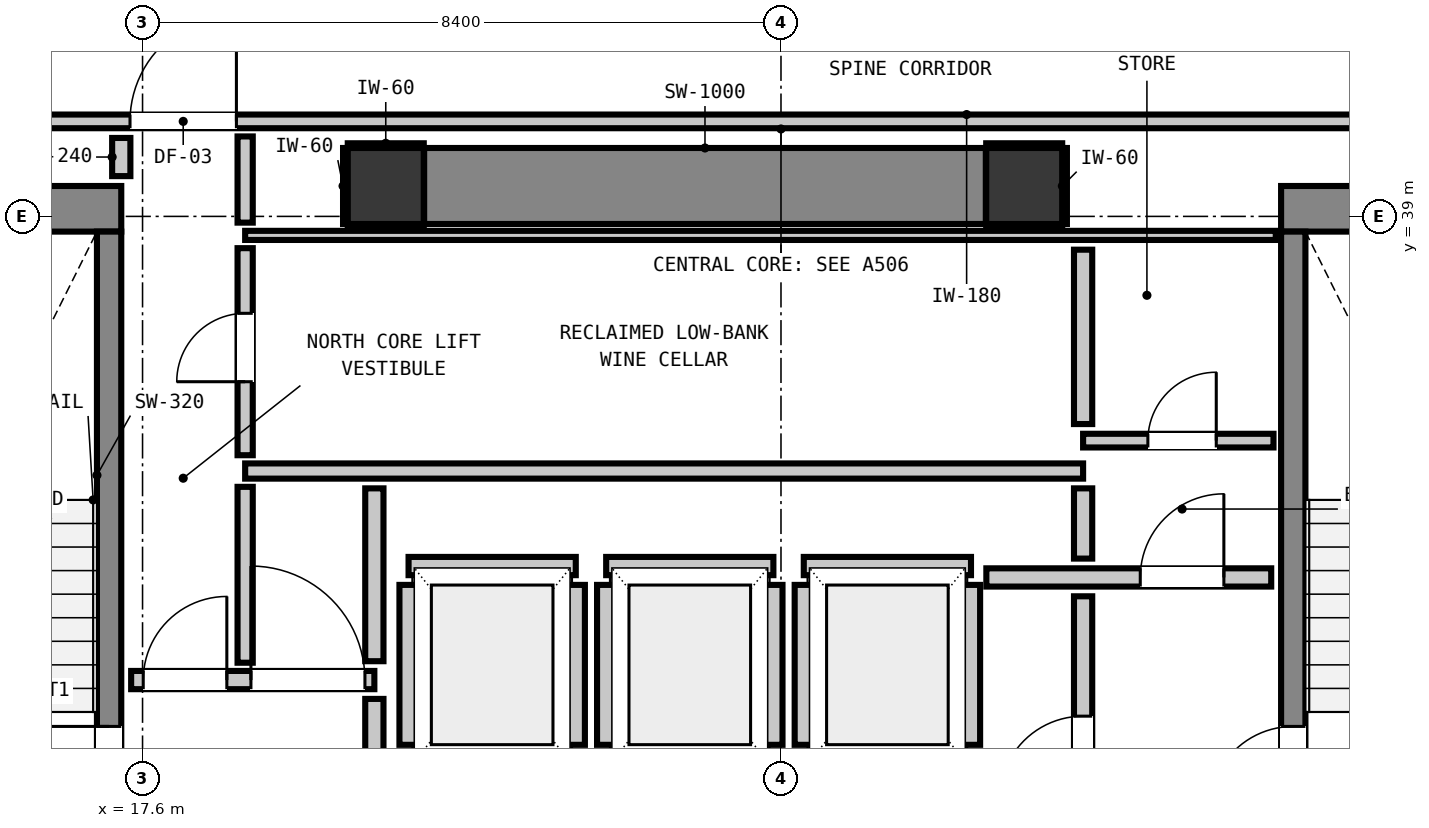
"""IFC4 building model, lengths in metres.
Left out: names, types, materials, properties, quantities, classifications, styles, units other than length and angle.
Written with IfcOpenShell. Run it as: python <this file> out.ifc"""

import sys

from ifc_helpers import new_model, si_unit, direction, frame, frame_2d, origin, origin_2d, place, context, subcontext, project, spatial, rectangle, extrude, element, fill, save


model = new_model("IFC4")
c1 = context("Model", 3, precision=1e-05, world=origin(), true_north=direction((0.0, 1.0)))
c2 = subcontext(c1, "Body", "Model", "MODEL_VIEW")
j1 = project(units=[si_unit("LENGTHUNIT", "METRE"), si_unit("PLANEANGLEUNIT", "RADIAN")], contexts=[c1])
p1 = place(None, origin())
s1 = spatial("IfcSite", under=j1, at=p1, CompositionType="ELEMENT")
p2 = place(p1, origin())
s2 = spatial("IfcBuilding", under=s1, at=p2, CompositionType="ELEMENT")
p3 = place(p2, frame((0.0, 0.0, 119.36)))
s3 = spatial("IfcBuildingStorey", under=s2, at=p3, CompositionType="ELEMENT", Elevation=119.36)
for number, where, z_axis, x_axis in (
    (1, (20.8, 39.4, 0.0), (0.0, 0.0, 1.0), (1.0, 0.0, 0.0)),
    (2, (29.2, 39.4, 0.0), (0.0, 0.0, 1.0), (1.0, 0.0, 0.0)),
):
    element("IfcColumn", number, at=place(p3, frame(where, z_axis=z_axis, x_axis=x_axis)), inside=s3, PredefinedType="COLUMN", context=c2, shape_type="SweptSolid", body=[
        extrude(rectangle(XDim=1.0, YDim=1.0, at=origin_2d()), origin(), (0.0, 0.0, 1.0), 3.32),
    ])
p4 = place(p3, frame((13.24, 39.1, 0.0), z_axis=(0.0, 0.0, 1.0), x_axis=(1.0, 0.0, 0.0)))
e3 = element("IfcWall", 3, at=p4, inside=s3, PredefinedType="SHEAR", context=c2, shape_type="SweptSolid", body=[
    extrude(rectangle(XDim=4.08, YDim=0.6, at=frame_2d((2.04, 0.0))), origin(), (0.0, 0.0, 1.0), 3.32),
])
p5 = place(p3, frame((32.58, 39.1, 0.0), z_axis=(0.0, 0.0, 1.0), x_axis=(1.0, 0.0, 0.0)))
e4 = element("IfcWall", 4, at=p5, inside=s3, PredefinedType="SHEAR", context=c2, shape_type="SweptSolid", body=[
    extrude(rectangle(XDim=4.08, YDim=0.6, at=frame_2d((2.04, 0.0))), origin(), (0.0, 0.0, 1.0), 3.32),
])
p6 = place(p3, frame((21.305, 39.4, 0.0), z_axis=(0.0, 0.0, 1.0), x_axis=(1.0, 0.0, 0.0)))
e5 = element("IfcWall", 5, at=p6, inside=s3, PredefinedType="SHEAR", context=c2, shape_type="SweptSolid", body=[
    extrude(rectangle(XDim=7.39, YDim=1.0, at=frame_2d((3.695, 0.0))), origin(), (0.0, 0.0, 1.0), 3.32),
])
p7 = place(p3, frame((17.16, 31.0, 0.0), z_axis=(0.0, 0.0, 1.0), x_axis=(0.0, 1.0, 0.0)))
e6 = element("IfcWall", 6, at=p7, inside=s3, PredefinedType="SHEAR", context=c2, shape_type="SweptSolid", body=[
    extrude(rectangle(XDim=7.8, YDim=0.32, at=frame_2d((3.9, 0.0))), origin(), (0.0, 0.0, 1.0), 3.32),
])
p8 = place(p7, frame((0.19, 0.0, 0.0)))
e7 = element("IfcOpeningElement", 7, at=p8, cuts=e6, PredefinedType="OPENING", context=c2, shape_type="SweptSolid", body=[
    extrude(rectangle(XDim=1.1, YDim=2.15, at=frame_2d((0.55, 1.075))), frame((0.0, 0.17, 0.0), z_axis=(0.0, -1.0, 0.0), x_axis=(1.0, 0.0, 0.0)), (0.0, 0.0, 1.0), 0.34),
])
p9 = place(p3, frame((32.74, 31.0, 0.0), z_axis=(0.0, 0.0, 1.0), x_axis=(0.0, 1.0, 0.0)))
e8 = element("IfcWall", 8, at=p9, inside=s3, PredefinedType="SHEAR", context=c2, shape_type="SweptSolid", body=[
    extrude(rectangle(XDim=7.8, YDim=0.32, at=frame_2d((3.9, 0.0))), origin(), (0.0, 0.0, 1.0), 3.32),
])
p10 = place(p9, frame((0.19, 0.0, 0.0)))
e9 = element("IfcOpeningElement", 9, at=p10, cuts=e8, PredefinedType="OPENING", context=c2, shape_type="SweptSolid", body=[
    extrude(rectangle(XDim=1.1, YDim=2.15, at=frame_2d((0.55, 1.075))), frame((0.0, 0.17, 0.0), z_axis=(0.0, -1.0, 0.0), x_axis=(1.0, 0.0, 0.0)), (0.0, 0.0, 1.0), 0.34),
])
p11 = place(p3, frame((21.1, 34.4, 0.0), z_axis=(0.0, 0.0, 1.0), x_axis=(1.0, 0.0, 0.0)))
e10 = element("IfcWall", 10, at=p11, inside=s3, PredefinedType="PARTITIONING", context=c2, shape_type="SweptSolid", body=[
    extrude(rectangle(XDim=2.2, YDim=0.24, at=frame_2d((1.1, 0.0))), origin(), (0.0, 0.0, 1.0), 3.08),
])
p12 = place(p3, frame((21.1, 32.048, 0.0), z_axis=(0.0, 0.0, 1.0), x_axis=(0.0, 1.0, 0.0)))
e11 = element("IfcWall", 11, at=p12, inside=s3, PredefinedType="PARTITIONING", context=c2, shape_type="SweptSolid", body=[
    extrude(rectangle(XDim=2.104, YDim=0.24, at=frame_2d((1.052, 0.0))), origin(), (0.0, 0.0, 1.0), 2.315),
])
p13 = place(p3, frame((23.3, 32.048, 0.0), z_axis=(0.0, 0.0, 1.0), x_axis=(0.0, 1.0, 0.0)))
e12 = element("IfcWall", 12, at=p13, inside=s3, PredefinedType="PARTITIONING", context=c2, shape_type="SweptSolid", body=[
    extrude(rectangle(XDim=2.104, YDim=0.24, at=frame_2d((1.052, 0.0))), origin(), (0.0, 0.0, 1.0), 3.08),
])
p14 = place(p3, frame((23.7, 34.4, 0.0), z_axis=(0.0, 0.0, 1.0), x_axis=(1.0, 0.0, 0.0)))
e13 = element("IfcWall", 13, at=p14, inside=s3, PredefinedType="PARTITIONING", context=c2, shape_type="SweptSolid", body=[
    extrude(rectangle(XDim=2.2, YDim=0.24, at=frame_2d((1.1, 0.0))), origin(), (0.0, 0.0, 1.0), 3.08),
])
for number, where, z_axis, x_axis in (
    (14, (23.7, 32.048, 0.0), (0.0, 0.0, 1.0), (0.0, 1.0, 0.0)),
    (15, (25.9, 32.048, 0.0), (0.0, 0.0, 1.0), (0.0, 1.0, 0.0)),
):
    element("IfcWall", number, at=place(p3, frame(where, z_axis=z_axis, x_axis=x_axis)), inside=s3, PredefinedType="PARTITIONING", context=c2, shape_type="SweptSolid", body=[
        extrude(rectangle(XDim=2.104, YDim=0.24, at=frame_2d((1.052, 0.0))), origin(), (0.0, 0.0, 1.0), 3.08),
    ])
p15 = place(p3, frame((26.3, 34.4, 0.0), z_axis=(0.0, 0.0, 1.0), x_axis=(1.0, 0.0, 0.0)))
e16 = element("IfcWall", 16, at=p15, inside=s3, PredefinedType="PARTITIONING", context=c2, shape_type="SweptSolid", body=[
    extrude(rectangle(XDim=2.2, YDim=0.24, at=frame_2d((1.1, 0.0))), origin(), (0.0, 0.0, 1.0), 3.08),
])
for number, where, z_axis, x_axis in (
    (17, (26.3, 32.048, 0.0), (0.0, 0.0, 1.0), (0.0, 1.0, 0.0)),
    (18, (28.5, 32.048, 0.0), (0.0, 0.0, 1.0), (0.0, 1.0, 0.0)),
):
    element("IfcWall", number, at=place(p3, frame(where, z_axis=z_axis, x_axis=x_axis)), inside=s3, PredefinedType="PARTITIONING", context=c2, shape_type="SweptSolid", body=[
        extrude(rectangle(XDim=2.104, YDim=0.24, at=frame_2d((1.052, 0.0))), origin(), (0.0, 0.0, 1.0), 3.08),
    ])
p16 = place(p3, frame((17.45, 32.9, 0.0), z_axis=(0.0, 0.0, 1.0), x_axis=(1.0, 0.0, 0.0)))
e19 = element("IfcWall", 19, at=p16, inside=s3, PredefinedType="PARTITIONING", context=c2, shape_type="SweptSolid", body=[
    extrude(rectangle(XDim=3.2, YDim=0.24, at=frame_2d((1.6, 0.0))), origin(), (0.0, 0.0, 1.0), 3.08),
])
p17 = place(p16, frame((0.159, 0.0, 0.0)))
e20 = element("IfcOpeningElement", 20, at=p17, cuts=e19, PredefinedType="OPENING", context=c2, shape_type="SweptSolid", body=[
    extrude(rectangle(XDim=1.1, YDim=2.15, at=frame_2d((0.55, 1.075))), frame((0.0, 0.13, 0.0), z_axis=(0.0, -1.0, 0.0), x_axis=(1.0, 0.0, 0.0)), (0.0, 0.0, 1.0), 0.26),
])
p18 = place(p16, frame((1.576, 0.0, 0.0)))
e21 = element("IfcOpeningElement", 21, at=p18, cuts=e19, PredefinedType="OPENING", context=c2, shape_type="SweptSolid", body=[
    extrude(rectangle(XDim=1.5, YDim=2.15, at=frame_2d((0.75, 1.075))), frame((0.0, 0.13, 0.0), z_axis=(0.0, -1.0, 0.0), x_axis=(1.0, 0.0, 0.0)), (0.0, 0.0, 1.0), 0.26),
])
p19 = place(p3, frame((28.702, 34.25, 0.0), z_axis=(0.0, 0.0, 1.0), x_axis=(1.0, 0.0, 0.0)))
e22 = element("IfcWall", 22, at=p19, inside=s3, PredefinedType="PARTITIONING", context=c2, shape_type="SweptSolid", body=[
    extrude(rectangle(XDim=3.748, YDim=0.24, at=frame_2d((1.874, 0.0))), origin(), (0.0, 0.0, 1.0), 3.08),
])
p20 = place(p19, frame((2.025, 0.0, 0.0)))
e23 = element("IfcOpeningElement", 23, at=p20, cuts=e22, PredefinedType="OPENING", context=c2, shape_type="SweptSolid", body=[
    extrude(rectangle(XDim=1.1, YDim=2.15, at=frame_2d((0.55, 1.075))), frame((0.0, 0.13, 0.0), z_axis=(0.0, -1.0, 0.0), x_axis=(1.0, 0.0, 0.0)), (0.0, 0.0, 1.0), 0.26),
])
p21 = place(p3, frame((18.95, 35.65, 0.0), z_axis=(0.0, 0.0, 1.0), x_axis=(1.0, 0.0, 0.0)))
e24 = element("IfcWall", 24, at=p21, inside=s3, PredefinedType="PARTITIONING", context=c2, shape_type="SweptSolid", body=[
    extrude(rectangle(XDim=11.025, YDim=0.2, at=frame_2d((5.513, 0.0))), origin(), (0.0, 0.0, 1.0), 3.08),
])
p22 = place(p3, frame((29.975, 36.05, 0.0), z_axis=(0.0, 0.0, 1.0), x_axis=(1.0, 0.0, 0.0)))
e25 = element("IfcWall", 25, at=p22, inside=s3, PredefinedType="PARTITIONING", context=c2, shape_type="SweptSolid", body=[
    extrude(rectangle(XDim=2.505, YDim=0.18, at=frame_2d((1.252, 0.0))), origin(), (0.0, 0.0, 1.0), 3.08),
])
p23 = place(p22, frame((0.852, 0.0, 0.0)))
e26 = element("IfcOpeningElement", 26, at=p23, cuts=e25, PredefinedType="OPENING", context=c2, shape_type="SweptSolid", body=[
    extrude(rectangle(XDim=0.9, YDim=2.1, at=frame_2d((0.45, 1.05))), frame((0.0, 0.1, 0.0), z_axis=(0.0, -1.0, 0.0), x_axis=(1.0, 0.0, 0.0)), (0.0, 0.0, 1.0), 0.2),
])
p24 = place(p3, frame((12.979, 40.25, 0.0), z_axis=(0.0, 0.0, 1.0), x_axis=(1.0, 0.0, 0.0)))
e27 = element("IfcWall", 27, at=p24, inside=s3, PredefinedType="PARTITIONING", context=c2, shape_type="SweptSolid", body=[
    extrude(rectangle(XDim=29.614, YDim=0.18, at=frame_2d((14.807, 0.0))), origin(), (0.0, 0.0, 1.0), 3.08),
])
p25 = place(p24, frame((4.456, 0.0, 0.0)))
e28 = element("IfcOpeningElement", 28, at=p25, cuts=e27, PredefinedType="OPENING", context=c2, shape_type="SweptSolid", body=[
    extrude(rectangle(XDim=1.4, YDim=2.15, at=frame_2d((0.7, 1.075))), frame((0.0, 0.1, 0.0), z_axis=(0.0, -1.0, 0.0), x_axis=(1.0, 0.0, 0.0)), (0.0, 0.0, 1.0), 0.2),
])
p26 = place(p24, frame((25.071, 0.0, 0.0)))
e29 = element("IfcOpeningElement", 29, at=p26, cuts=e27, PredefinedType="OPENING", context=c2, shape_type="SweptSolid", body=[
    extrude(rectangle(XDim=1.4, YDim=2.15, at=frame_2d((0.7, 1.075))), frame((0.0, 0.1, 0.0), z_axis=(0.0, -1.0, 0.0), x_axis=(1.0, 0.0, 0.0)), (0.0, 0.0, 1.0), 0.2),
])
p27 = place(p24, frame((27.642, 0.0, 0.0)))
e30 = element("IfcOpeningElement", 30, at=p27, cuts=e27, PredefinedType="OPENING", context=c2, shape_type="SweptSolid", body=[
    extrude(rectangle(XDim=0.9, YDim=2.1, at=frame_2d((0.45, 1.05))), frame((0.0, 0.1, 0.0), z_axis=(0.0, -1.0, 0.0), x_axis=(1.0, 0.0, 0.0)), (0.0, 0.0, 1.0), 0.2),
])
p28 = place(p3, frame((18.95, 38.75, 0.0), z_axis=(0.0, 0.0, 1.0), x_axis=(1.0, 0.0, 0.0)))
e31 = element("IfcWall", 31, at=p28, inside=s3, PredefinedType="PARTITIONING", context=c2, shape_type="SweptSolid", body=[
    extrude(rectangle(XDim=13.56, YDim=0.12, at=frame_2d((6.78, 0.0))), origin(), (0.0, 0.0, 1.0), 3.08),
])
p29 = place(p3, frame((17.32, 39.53, 0.0), z_axis=(0.0, 0.0, 1.0), x_axis=(0.0, 1.0, 0.0)))
e32 = element("IfcWall", 32, at=p29, inside=s3, PredefinedType="PARTITIONING", context=c2, shape_type="SweptSolid", body=[
    extrude(rectangle(XDim=0.502, YDim=0.24, at=frame_2d((0.251, 0.0))), origin(), (0.0, 0.0, 1.0), 3.08),
])
p30 = place(p3, frame((20.65, 31.868, 0.0), z_axis=(0.0, 0.0, 1.0), x_axis=(0.0, 1.0, 0.0)))
e33 = element("IfcWall", 33, at=p30, inside=s3, PredefinedType="PARTITIONING", context=c2, shape_type="SweptSolid", body=[
    extrude(rectangle(XDim=0.784, YDim=0.24, at=frame_2d((0.392, 0.0))), origin(), (0.0, 0.0, 1.0), 2.315),
])
p31 = place(p3, frame((20.65, 33.148, 0.0), z_axis=(0.0, 0.0, 1.0), x_axis=(0.0, 1.0, 0.0)))
e34 = element("IfcWall", 34, at=p31, inside=s3, PredefinedType="PARTITIONING", context=c2, shape_type="SweptSolid", body=[
    extrude(rectangle(XDim=2.274, YDim=0.24, at=frame_2d((1.137, 0.0))), origin(), (0.0, 0.0, 1.0), 2.315),
])
p32 = place(p3, frame((29.975, 29.768, 0.0), z_axis=(0.0, 0.0, 1.0), x_axis=(0.0, 1.0, 0.0)))
e35 = element("IfcWall", 35, at=p32, inside=s3, PredefinedType="PARTITIONING", context=c2, shape_type="SweptSolid", body=[
    extrude(rectangle(XDim=4.234, YDim=0.24, at=frame_2d((2.117, 0.0))), origin(), (0.0, 0.0, 1.0), 3.08),
])
p33 = place(p32, frame((1.557, 0.0, 0.0)))
e36 = element("IfcOpeningElement", 36, at=p33, cuts=e35, PredefinedType="OPENING", context=c2, shape_type="SweptSolid", body=[
    extrude(rectangle(XDim=1.1, YDim=2.15, at=frame_2d((0.55, 1.075))), frame((0.0, 0.13, 0.0), z_axis=(0.0, -1.0, 0.0), x_axis=(1.0, 0.0, 0.0)), (0.0, 0.0, 1.0), 0.26),
])
p34 = place(p3, frame((29.975, 34.498, 0.0), z_axis=(0.0, 0.0, 1.0), x_axis=(0.0, 1.0, 0.0)))
e37 = element("IfcWall", 37, at=p34, inside=s3, PredefinedType="PARTITIONING", context=c2, shape_type="SweptSolid", body=[
    extrude(rectangle(XDim=0.924, YDim=0.24, at=frame_2d((0.462, 0.0))), origin(), (0.0, 0.0, 1.0), 3.08),
])
p35 = place(p3, frame((29.975, 36.268, 0.0), z_axis=(0.0, 0.0, 1.0), x_axis=(0.0, 1.0, 0.0)))
e38 = element("IfcWall", 38, at=p35, inside=s3, PredefinedType="PARTITIONING", context=c2, shape_type="SweptSolid", body=[
    extrude(rectangle(XDim=2.294, YDim=0.24, at=frame_2d((1.147, 0.0))), origin(), (0.0, 0.0, 1.0), 3.08),
])
p36 = place(p3, frame((18.95, 33.128, 0.0), z_axis=(0.0, 0.0, 1.0), x_axis=(0.0, 1.0, 0.0)))
e39 = element("IfcWall", 39, at=p36, inside=s3, PredefinedType="PARTITIONING", context=c2, shape_type="SweptSolid", body=[
    extrude(rectangle(XDim=2.314, YDim=0.2, at=frame_2d((1.157, 0.0))), origin(), (0.0, 0.0, 1.0), 3.08),
])
p37 = place(p3, frame((18.95, 35.858, 0.0), z_axis=(0.0, 0.0, 1.0), x_axis=(0.0, 1.0, 0.0)))
e40 = element("IfcWall", 40, at=p37, inside=s3, PredefinedType="PARTITIONING", context=c2, shape_type="SweptSolid", body=[
    extrude(rectangle(XDim=2.724, YDim=0.2, at=frame_2d((1.362, 0.0))), origin(), (0.0, 0.0, 1.0), 3.08),
])
p38 = place(p37, frame((0.967, 0.0, 0.0)))
e41 = element("IfcOpeningElement", 41, at=p38, cuts=e40, PredefinedType="OPENING", context=c2, shape_type="SweptSolid", body=[
    extrude(rectangle(XDim=0.9, YDim=2.1, at=frame_2d((0.45, 1.05))), frame((0.0, 0.11, 0.0), z_axis=(0.0, -1.0, 0.0), x_axis=(1.0, 0.0, 0.0)), (0.0, 0.0, 1.0), 0.22),
])
p39 = place(p3, frame((18.95, 38.918, 0.0), z_axis=(0.0, 0.0, 1.0), x_axis=(0.0, 1.0, 0.0)))
e42 = element("IfcWall", 42, at=p39, inside=s3, PredefinedType="PARTITIONING", context=c2, shape_type="SweptSolid", body=[
    extrude(rectangle(XDim=1.134, YDim=0.2, at=frame_2d((0.567, 0.0))), origin(), (0.0, 0.0, 1.0), 3.08),
])
for number, where, z_axis, x_axis in (
    (43, (20.3, 38.868, 0.0), (0.0, 0.0, 1.0), (1.0, 0.0, 0.0)),
    (44, (20.3, 39.932, 0.0), (0.0, 0.0, 1.0), (1.0, 0.0, 0.0)),
    (45, (20.268, 38.9, 0.0), (0.0, 0.0, 1.0), (0.0, 1.0, 0.0)),
    (46, (28.7, 38.868, 0.0), (0.0, 0.0, 1.0), (1.0, 0.0, 0.0)),
    (47, (28.7, 39.932, 0.0), (0.0, 0.0, 1.0), (1.0, 0.0, 0.0)),
    (48, (29.732, 38.9, 0.0), (0.0, 0.0, 1.0), (0.0, 1.0, 0.0)),
):
    element("IfcWall", number, at=place(p3, frame(where, z_axis=z_axis, x_axis=x_axis)), inside=s3, PredefinedType="PARTITIONING", context=c2, shape_type="SweptSolid", body=[
        extrude(rectangle(XDim=1.0, YDim=0.06, at=frame_2d((0.5, 0.0))), origin(), (0.0, 0.0, 1.0), 1.45),
    ])
p40 = place(p8, origin())
e49 = element("IfcDoor", 49, at=p40, inside=s3, OperationType="SINGLE_SWING_RIGHT", PredefinedType="DOOR", context=c2, shape_type="SweptSolid", body=[
    extrude(rectangle(XDim=1.1, YDim=2.15, at=frame_2d((0.55, 1.075))), frame((0.0, 0.025, 0.0), z_axis=(0.0, -1.0, 0.0), x_axis=(1.0, 0.0, 0.0)), (0.0, 0.0, 1.0), 0.05),
])
fill(e7, e49)
p41 = place(p10, origin())
e50 = element("IfcDoor", 50, at=p41, inside=s3, OperationType="SINGLE_SWING_LEFT", PredefinedType="DOOR", context=c2, shape_type="SweptSolid", body=[
    extrude(rectangle(XDim=1.1, YDim=2.15, at=frame_2d((0.55, 1.075))), frame((0.0, 0.025, 0.0), z_axis=(0.0, -1.0, 0.0), x_axis=(1.0, 0.0, 0.0)), (0.0, 0.0, 1.0), 0.05),
])
fill(e9, e50)
p42 = place(p17, origin())
e51 = element("IfcDoor", 51, at=p42, inside=s3, OperationType="SINGLE_SWING_RIGHT", PredefinedType="DOOR", context=c2, shape_type="SweptSolid", body=[
    extrude(rectangle(XDim=1.1, YDim=2.15, at=frame_2d((0.55, 1.075))), frame((0.0, 0.025, 0.0), z_axis=(0.0, -1.0, 0.0), x_axis=(1.0, 0.0, 0.0)), (0.0, 0.0, 1.0), 0.05),
])
fill(e20, e51)
p43 = place(p33, origin())
e52 = element("IfcDoor", 52, at=p43, inside=s3, OperationType="SINGLE_SWING_LEFT", PredefinedType="DOOR", context=c2, shape_type="SweptSolid", body=[
    extrude(rectangle(XDim=1.1, YDim=2.15, at=frame_2d((0.55, 1.075))), frame((0.0, 0.025, 0.0), z_axis=(0.0, -1.0, 0.0), x_axis=(1.0, 0.0, 0.0)), (0.0, 0.0, 1.0), 0.05),
])
fill(e36, e52)
p44 = place(p20, origin())
e53 = element("IfcDoor", 53, at=p44, inside=s3, OperationType="SINGLE_SWING_RIGHT", PredefinedType="DOOR", context=c2, shape_type="SweptSolid", body=[
    extrude(rectangle(XDim=1.1, YDim=2.15, at=frame_2d((0.55, 1.075))), frame((0.0, 0.025, 0.0), z_axis=(0.0, -1.0, 0.0), x_axis=(1.0, 0.0, 0.0)), (0.0, 0.0, 1.0), 0.05),
])
fill(e23, e53)
p45 = place(p25, origin())
e54 = element("IfcDoor", 54, at=p45, inside=s3, OperationType="SINGLE_SWING_RIGHT", PredefinedType="DOOR", context=c2, shape_type="SweptSolid", body=[
    extrude(rectangle(XDim=1.4, YDim=2.15, at=frame_2d((0.7, 1.075))), frame((0.0, 0.025, 0.0), z_axis=(0.0, -1.0, 0.0), x_axis=(1.0, 0.0, 0.0)), (0.0, 0.0, 1.0), 0.05),
])
fill(e28, e54)
p46 = place(p18, origin())
e55 = element("IfcDoor", 55, at=p46, inside=s3, OperationType="SINGLE_SWING_LEFT", PredefinedType="DOOR", context=c2, shape_type="SweptSolid", body=[
    extrude(rectangle(XDim=1.5, YDim=2.15, at=frame_2d((0.75, 1.075))), frame((0.0, 0.025, 0.0), z_axis=(0.0, -1.0, 0.0), x_axis=(1.0, 0.0, 0.0)), (0.0, 0.0, 1.0), 0.05),
])
fill(e21, e55)
p47 = place(p23, origin())
e56 = element("IfcDoor", 56, at=p47, inside=s3, OperationType="SINGLE_SWING_RIGHT", PredefinedType="DOOR", context=c2, shape_type="SweptSolid", body=[
    extrude(rectangle(XDim=0.9, YDim=2.1, at=frame_2d((0.45, 1.05))), frame((0.0, 0.025, 0.0), z_axis=(0.0, -1.0, 0.0), x_axis=(1.0, 0.0, 0.0)), (0.0, 0.0, 1.0), 0.05),
])
fill(e26, e56)
p48 = place(p38, origin())
e57 = element("IfcDoor", 57, at=p48, inside=s3, OperationType="SINGLE_SWING_LEFT", PredefinedType="DOOR", context=c2, shape_type="SweptSolid", body=[
    extrude(rectangle(XDim=0.9, YDim=2.1, at=frame_2d((0.45, 1.05))), frame((0.0, 0.025, 0.0), z_axis=(0.0, -1.0, 0.0), x_axis=(1.0, 0.0, 0.0)), (0.0, 0.0, 1.0), 0.05),
])
fill(e41, e57)
save(model, sys.argv[1])
